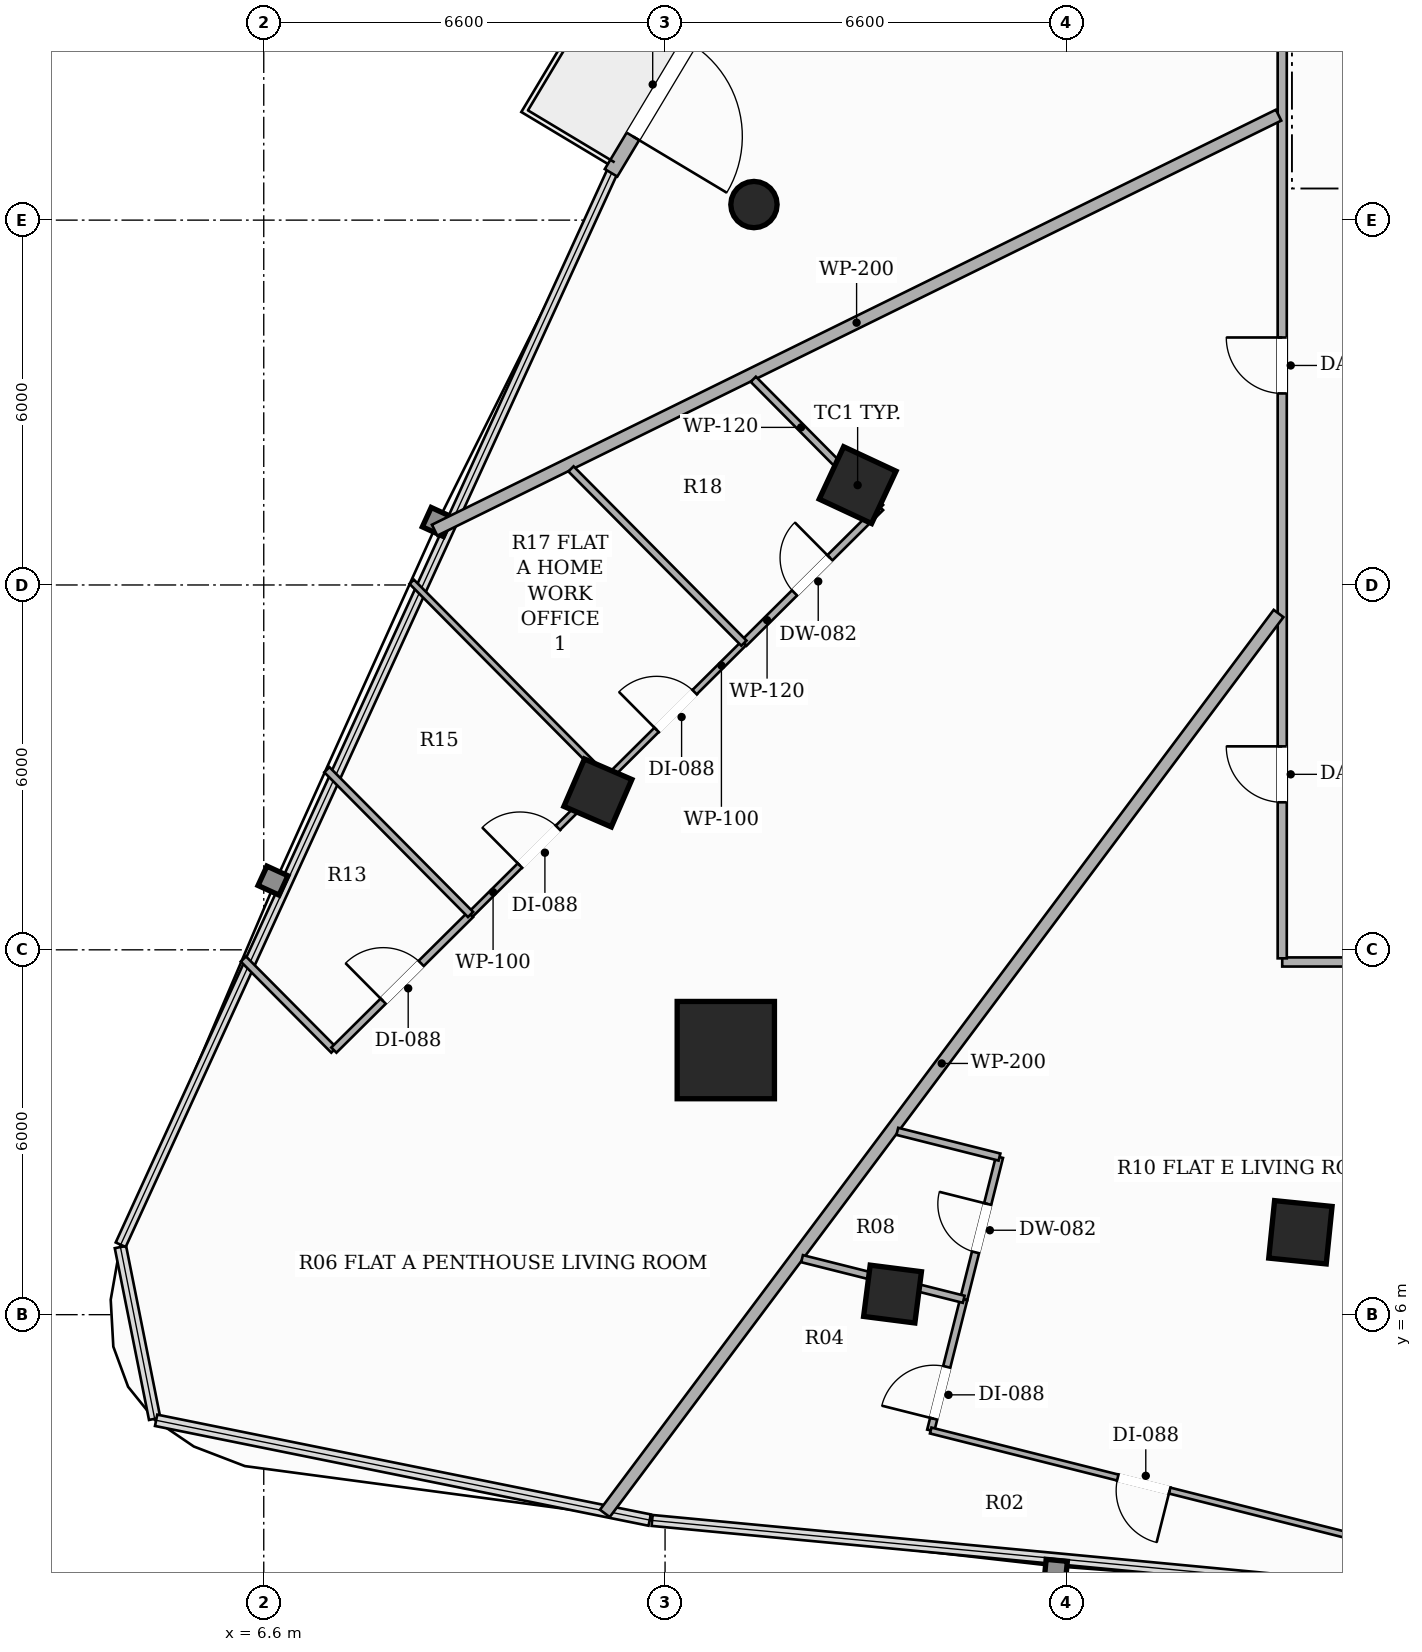
"""IFC4 building model, lengths in metres.
Left out: names, types, materials, properties, quantities, classifications, styles, units other than length and angle.
Written with IfcOpenShell. Run it as: python <this file> out.ifc"""

import sys

from ifc_helpers import new_model, si_unit, direction, frame, frame_2d, origin, origin_2d, place, context, subcontext, project, spatial, rectangle, hollow_rectangle, hollow_circle, extrude, element, fill, save


model = new_model("IFC4")
c1 = context("Model", 3, precision=1e-05, world=origin(), true_north=direction((0.0, 1.0)))
c2 = subcontext(c1, "Body", "Model", "MODEL_VIEW")
j1 = project(units=[si_unit("LENGTHUNIT", "METRE"), si_unit("PLANEANGLEUNIT", "RADIAN")], contexts=[c1])
p1 = place(None, origin())
s1 = spatial("IfcSite", under=j1, at=p1, CompositionType="ELEMENT")
p2 = place(p1, origin())
s2 = spatial("IfcBuilding", under=s1, at=p2, CompositionType="ELEMENT")
p3 = place(p2, frame((0.0, 0.0, 33.5)))
s3 = spatial("IfcBuildingStorey", under=s2, at=p3, CompositionType="ELEMENT", Elevation=33.5)
p4 = place(p3, frame((14.199, 10.351, 0.0), z_axis=(0.0, 0.0, 1.0), x_axis=(1.0, 0.0, 0.0)))
e1 = element("IfcColumn", 1, at=p4, inside=s3, PredefinedType="COLUMN", context=c2, shape_type="SweptSolid", body=[
    extrude(hollow_rectangle(XDim=1.6, YDim=1.6, WallThickness=0.05, at=origin_2d()), origin(), (0.0, 0.0, 1.0), 3.3),
])
for number, where, z_axis, x_axis in (
    (2, (16.367, 19.642, 0.0), (0.0, 0.0, 1.0), (0.423, 0.906, 0.0)),
    (3, (23.649, 7.355, 0.0), (0.0, 0.0, 1.0), (-0.995, 0.101, 0.0)),
):
    element("IfcColumn", number, at=place(p3, frame(where, z_axis=z_axis, x_axis=x_axis)), inside=s3, PredefinedType="COLUMN", context=c2, shape_type="SweptSolid", body=[
        extrude(hollow_rectangle(XDim=0.95, YDim=0.95, WallThickness=0.032, at=origin_2d()), origin(), (0.0, 0.0, 1.0), 3.3),
    ])
for number, where, z_axis, x_axis in (
    (4, (12.095, 14.58, 0.0), (0.0, 0.0, 1.0), (0.397, 0.918, 0.0)),
    (5, (16.941, 6.339, 0.0), (0.0, 0.0, 1.0), (-0.992, 0.127, 0.0)),
):
    element("IfcColumn", number, at=place(p3, frame(where, z_axis=z_axis, x_axis=x_axis)), inside=s3, PredefinedType="COLUMN", context=c2, shape_type="SweptSolid", body=[
        extrude(hollow_rectangle(XDim=0.85, YDim=0.85, WallThickness=0.028, at=origin_2d()), origin(), (0.0, 0.0, 1.0), 3.3),
    ])
p5 = place(p3, frame((14.662, 24.256, 0.0), z_axis=(0.0, 0.0, 1.0), x_axis=(1.0, 0.0, 0.0)))
e6 = element("IfcColumn", 6, at=p5, inside=s3, PredefinedType="COLUMN", context=c2, shape_type="SweptSolid", body=[
    extrude(hollow_circle(Radius=0.381, WallThickness=0.022, at=origin_2d()), origin(), (0.0, 0.0, 1.0), 3.3),
])
p6 = place(p3, frame((19.059, 36.028, 0.0), z_axis=(0.0, 0.0, 1.0), x_axis=(-0.514331531946, -0.857591438417, 0.0)))
e7 = element("IfcWall", 7, at=p6, inside=s3, PredefinedType="SOLIDWALL", context=c2, shape_type="SweptSolid", body=[
    extrude(rectangle(XDim=13.118, YDim=0.24, at=frame_2d((6.559, 0.0))), origin(), (0.0, 0.0, 1.0), 2.624),
])
p7 = place(p6, frame((10.62, 0.0, 0.0)))
e8 = element("IfcOpeningElement", 8, at=p7, cuts=e7, PredefinedType="OPENING", context=c2, shape_type="SweptSolid", body=[
    extrude(rectangle(XDim=1.8, YDim=2.2, at=frame_2d((0.9, 1.1))), frame((0.0, 0.13, 0.0), z_axis=(0.0, -1.0, 0.0), x_axis=(1.0, 0.0, 0.0)), (0.0, 0.0, 1.0), 0.26),
])
p8 = place(p3, frame((42.59, 11.8, 0.0), z_axis=(0.0, 0.0, 1.0), x_axis=(-1.0, 0.0, 0.0)))
e9 = element("IfcWall", 9, at=p8, inside=s3, PredefinedType="PARTITIONING", context=c2, shape_type="SweptSolid", body=[
    extrude(rectangle(XDim=19.24, YDim=0.15, at=frame_2d((9.62, 0.0))), origin(), (0.0, 0.0, 1.0), 2.669),
])
p9 = place(p8, frame((10.462, 0.0, 0.0)))
e10 = element("IfcOpeningElement", 10, at=p9, cuts=e9, PredefinedType="OPENING", context=c2, shape_type="SweptSolid", body=[
    extrude(rectangle(XDim=0.92, YDim=2.15, at=frame_2d((0.46, 1.075))), frame((0.0, 0.085, 0.0), z_axis=(0.0, -1.0, 0.0), x_axis=(1.0, 0.0, 0.0)), (0.0, 0.0, 1.0), 0.17),
])
p10 = place(p3, frame((23.35, 11.86, 0.0), z_axis=(0.0, 0.0, 1.0), x_axis=(0.0, 1.0, 0.0)))
e11 = element("IfcWall", 11, at=p10, inside=s3, PredefinedType="PARTITIONING", context=c2, shape_type="SweptSolid", body=[
    extrude(rectangle(XDim=25.04, YDim=0.15, at=frame_2d((12.52, 0.0))), origin(), (0.0, 0.0, 1.0), 2.413),
])
p11 = place(p10, frame((9.29, 0.0, 0.0)))
e12 = element("IfcOpeningElement", 12, at=p11, cuts=e11, PredefinedType="OPENING", context=c2, shape_type="SweptSolid", body=[
    extrude(rectangle(XDim=0.92, YDim=2.15, at=frame_2d((0.46, 1.075))), frame((0.0, 0.085, 0.0), z_axis=(0.0, -1.0, 0.0), x_axis=(1.0, 0.0, 0.0)), (0.0, 0.0, 1.0), 0.17),
])
p12 = place(p10, frame((18.865, 0.0, 0.0)))
e13 = element("IfcOpeningElement", 13, at=p12, cuts=e11, PredefinedType="OPENING", context=c2, shape_type="SweptSolid", body=[
    extrude(rectangle(XDim=0.88, YDim=2.1, at=frame_2d((0.44, 1.05))), frame((0.0, 0.085, 0.0), z_axis=(0.0, -1.0, 0.0), x_axis=(1.0, 0.0, 0.0)), (0.0, 0.0, 1.0), 0.17),
])
p13 = place(p10, frame((2.566, 0.0, 0.0)))
e14 = element("IfcOpeningElement", 14, at=p13, cuts=e11, PredefinedType="OPENING", context=c2, shape_type="SweptSolid", body=[
    extrude(rectangle(XDim=0.92, YDim=2.15, at=frame_2d((0.46, 1.075))), frame((0.0, 0.085, 0.0), z_axis=(0.0, -1.0, 0.0), x_axis=(1.0, 0.0, 0.0)), (0.0, 0.0, 1.0), 0.17),
])
p14 = place(p3, frame((9.41, 18.901, 0.0), z_axis=(0.0, 0.0, 1.0), x_axis=(0.89737804177, 0.44126256373, 0.0)))
e15 = element("IfcWall", 15, at=p14, inside=s3, PredefinedType="PARTITIONING", context=c2, shape_type="SweptSolid", body=[
    extrude(rectangle(XDim=15.468, YDim=0.2, at=frame_2d((7.734, 0.0))), origin(), (0.0, 0.0, 1.0), 2.413),
])
p15 = place(p3, frame((23.29, 17.531, 0.0), z_axis=(0.0, 0.0, 1.0), x_axis=(-0.599334217596, -0.800498904196, 0.0)))
e16 = element("IfcWall", 16, at=p15, inside=s3, PredefinedType="PARTITIONING", context=c2, shape_type="SweptSolid", body=[
    extrude(rectangle(XDim=18.487, YDim=0.2, at=frame_2d((9.244, 0.0))), origin(), (0.0, 0.0, 1.0), 2.413),
])
p16 = place(p3, frame((27.447, 11.74, 0.0), z_axis=(0.0, 0.0, 1.0), x_axis=(-0.283867721737, -0.958863450422, 0.0)))
e17 = element("IfcWall", 17, at=p16, inside=s3, PredefinedType="PARTITIONING", context=c2, shape_type="SweptSolid", body=[
    extrude(rectangle(XDim=10.664, YDim=0.2, at=frame_2d((5.332, 0.0))), origin(), (0.0, 0.0, 1.0), 2.413),
])
p17 = place(p3, frame((14.497, 17.043, 0.0), z_axis=(0.0, 0.0, 1.0), x_axis=(0.709608291954, 0.704596389425, 0.0)))
e18 = element("IfcWall", 18, at=p17, inside=s3, PredefinedType="PARTITIONING", context=c2, shape_type="SweptSolid", body=[
    extrude(rectangle(XDim=3.166, YDim=0.12, at=frame_2d((1.583, 0.0))), origin(), (0.0, 0.0, 1.0), 2.413),
])
p18 = place(p17, frame((1.173, 0.0, 0.0)))
e19 = element("IfcOpeningElement", 19, at=p18, cuts=e18, PredefinedType="OPENING", context=c2, shape_type="SweptSolid", body=[
    extrude(rectangle(XDim=0.82, YDim=2.1, at=frame_2d((0.41, 1.05))), frame((0.0, 0.07, 0.0), z_axis=(0.0, -1.0, 0.0), x_axis=(1.0, 0.0, 0.0)), (0.0, 0.0, 1.0), 0.14),
])
p19 = place(p3, frame((16.744, 19.274, 0.0), z_axis=(0.0, 0.0, 1.0), x_axis=(-0.704390177625, 0.709812987811, 0.0)))
e20 = element("IfcWall", 20, at=p19, inside=s3, PredefinedType="PARTITIONING", context=c2, shape_type="SweptSolid", body=[
    extrude(rectangle(XDim=2.971, YDim=0.12, at=frame_2d((1.486, 0.0))), origin(), (0.0, 0.0, 1.0), 2.413),
])
p20 = place(p3, frame((6.265, 11.849, 0.0), z_axis=(0.0, 0.0, 1.0), x_axis=(0.7047325022, -0.709473114602, 0.0)))
e21 = element("IfcWall", 21, at=p20, inside=s3, PredefinedType="PARTITIONING", context=c2, shape_type="SweptSolid", body=[
    extrude(rectangle(XDim=2.112, YDim=0.12, at=frame_2d((1.056, 0.0))), origin(), (0.0, 0.0, 1.0), 2.619),
])
p21 = place(p3, frame((7.753, 10.351, 0.0), z_axis=(0.0, 0.0, 1.0), x_axis=(0.709953794815, 0.704248258236, 0.0)))
e22 = element("IfcWall", 22, at=p21, inside=s3, PredefinedType="PARTITIONING", context=c2, shape_type="SweptSolid", body=[
    extrude(rectangle(XDim=3.167, YDim=0.12, at=frame_2d((1.583, 0.0))), origin(), (0.0, 0.0, 1.0), 2.619),
])
p22 = place(p21, frame((1.143, 0.0, 0.0)))
e23 = element("IfcOpeningElement", 23, at=p22, cuts=e22, PredefinedType="OPENING", context=c2, shape_type="SweptSolid", body=[
    extrude(rectangle(XDim=0.88, YDim=2.1, at=frame_2d((0.44, 1.05))), frame((0.0, 0.07, 0.0), z_axis=(0.0, -1.0, 0.0), x_axis=(1.0, 0.0, 0.0)), (0.0, 0.0, 1.0), 0.14),
])
p23 = place(p3, frame((10.001, 12.581, 0.0), z_axis=(0.0, 0.0, 1.0), x_axis=(0.70979961262, 0.70440365553, 0.0)))
e24 = element("IfcWall", 24, at=p23, inside=s3, PredefinedType="PARTITIONING", context=c2, shape_type="SweptSolid", body=[
    extrude(rectangle(XDim=3.167, YDim=0.1, at=frame_2d((1.583, 0.0))), origin(), (0.0, 0.0, 1.0), 2.413),
])
p24 = place(p23, frame((1.144, 0.0, 0.0)))
e25 = element("IfcOpeningElement", 25, at=p24, cuts=e24, PredefinedType="OPENING", context=c2, shape_type="SweptSolid", body=[
    extrude(rectangle(XDim=0.88, YDim=2.1, at=frame_2d((0.44, 1.05))), frame((0.0, 0.06, 0.0), z_axis=(0.0, -1.0, 0.0), x_axis=(1.0, 0.0, 0.0)), (0.0, 0.0, 1.0), 0.12),
])
p25 = place(p3, frame((12.249, 14.812, 0.0), z_axis=(0.0, 0.0, 1.0), x_axis=(0.70979961262, 0.70440365553, 0.0)))
e26 = element("IfcWall", 26, at=p25, inside=s3, PredefinedType="PARTITIONING", context=c2, shape_type="SweptSolid", body=[
    extrude(rectangle(XDim=3.167, YDim=0.1, at=frame_2d((1.583, 0.0))), origin(), (0.0, 0.0, 1.0), 2.413),
])
p26 = place(p25, frame((1.144, 0.0, 0.0)))
e27 = element("IfcOpeningElement", 27, at=p26, cuts=e26, PredefinedType="OPENING", context=c2, shape_type="SweptSolid", body=[
    extrude(rectangle(XDim=0.88, YDim=2.1, at=frame_2d((0.44, 1.05))), frame((0.0, 0.06, 0.0), z_axis=(0.0, -1.0, 0.0), x_axis=(1.0, 0.0, 0.0)), (0.0, 0.0, 1.0), 0.12),
])
p27 = place(p3, frame((14.497, 17.043, 0.0), z_axis=(0.0, 0.0, 1.0), x_axis=(-0.704380529073, 0.70982256252, 0.0)))
e28 = element("IfcWall", 28, at=p27, inside=s3, PredefinedType="PARTITIONING", context=c2, shape_type="SweptSolid", body=[
    extrude(rectangle(XDim=4.038, YDim=0.12, at=frame_2d((2.019, 0.0))), origin(), (0.0, 0.0, 1.0), 2.413),
])
p28 = place(p3, frame((7.638, 14.962, 0.0), z_axis=(0.0, 0.0, 1.0), x_axis=(0.704445292194, -0.709758290058, 0.0)))
e29 = element("IfcWall", 29, at=p28, inside=s3, PredefinedType="PARTITIONING", context=c2, shape_type="SweptSolid", body=[
    extrude(rectangle(XDim=3.354, YDim=0.12, at=frame_2d((1.677, 0.0))), origin(), (0.0, 0.0, 1.0), 3.06),
])
p29 = place(p3, frame((9.033, 18.053, 0.0), z_axis=(0.0, 0.0, 1.0), x_axis=(0.704374497722, -0.709828547579, 0.0)))
e30 = element("IfcWall", 30, at=p29, inside=s3, PredefinedType="PARTITIONING", context=c2, shape_type="SweptSolid", body=[
    extrude(rectangle(XDim=4.566, YDim=0.1, at=frame_2d((2.283, 0.0))), origin(), (0.0, 0.0, 1.0), 2.413),
])
p30 = place(p3, frame((18.112, 6.253, 0.0), z_axis=(0.0, 0.0, 1.0), x_axis=(0.2437501366, 0.96983806427, 0.0)))
e31 = element("IfcWall", 31, at=p30, inside=s3, PredefinedType="PARTITIONING", context=c2, shape_type="SweptSolid", body=[
    extrude(rectangle(XDim=2.412, YDim=0.12, at=frame_2d((1.206, 0.0))), origin(), (0.0, 0.0, 1.0), 2.413),
])
p31 = place(p30, frame((0.796, 0.0, 0.0)))
e32 = element("IfcOpeningElement", 32, at=p31, cuts=e31, PredefinedType="OPENING", context=c2, shape_type="SweptSolid", body=[
    extrude(rectangle(XDim=0.82, YDim=2.1, at=frame_2d((0.41, 1.05))), frame((0.0, 0.07, 0.0), z_axis=(0.0, -1.0, 0.0), x_axis=(1.0, 0.0, 0.0)), (0.0, 0.0, 1.0), 0.14),
])
p32 = place(p3, frame((18.7, 8.592, 0.0), z_axis=(0.0, 0.0, 1.0), x_axis=(-0.969751613308, 0.244093851802, 0.0)))
e33 = element("IfcWall", 33, at=p32, inside=s3, PredefinedType="PARTITIONING", context=c2, shape_type="SweptSolid", body=[
    extrude(rectangle(XDim=1.732, YDim=0.12, at=frame_2d((0.866, 0.0))), origin(), (0.0, 0.0, 1.0), 2.669),
])
p33 = place(p3, frame((17.569, 4.095, 0.0), z_axis=(0.0, 0.0, 1.0), x_axis=(0.244006821807, 0.969773515266, 0.0)))
e34 = element("IfcWall", 34, at=p33, inside=s3, PredefinedType="PARTITIONING", context=c2, shape_type="SweptSolid", body=[
    extrude(rectangle(XDim=2.225, YDim=0.12, at=frame_2d((1.113, 0.0))), origin(), (0.0, 0.0, 1.0), 2.413),
])
p34 = place(p33, frame((0.2, 0.0, 0.0)))
e35 = element("IfcOpeningElement", 35, at=p34, cuts=e34, PredefinedType="OPENING", context=c2, shape_type="SweptSolid", body=[
    extrude(rectangle(XDim=0.88, YDim=2.1, at=frame_2d((0.44, 1.05))), frame((0.0, 0.07, 0.0), z_axis=(0.0, -1.0, 0.0), x_axis=(1.0, 0.0, 0.0)), (0.0, 0.0, 1.0), 0.14),
])
p35 = place(p3, frame((24.574, 2.334, 0.0), z_axis=(0.0, 0.0, 1.0), x_axis=(-0.9698235368, 0.243807931512, 0.0)))
e36 = element("IfcWall", 36, at=p35, inside=s3, PredefinedType="PARTITIONING", context=c2, shape_type="SweptSolid", body=[
    extrude(rectangle(XDim=7.223, YDim=0.1, at=frame_2d((3.611, 0.0))), origin(), (0.0, 0.0, 1.0), 3.06),
])
p36 = place(p35, frame((3.171, 0.0, 0.0)))
e37 = element("IfcOpeningElement", 37, at=p36, cuts=e36, PredefinedType="OPENING", context=c2, shape_type="SweptSolid", body=[
    extrude(rectangle(XDim=0.88, YDim=2.1, at=frame_2d((0.44, 1.05))), frame((0.0, 0.06, 0.0), z_axis=(0.0, -1.0, 0.0), x_axis=(1.0, 0.0, 0.0)), (0.0, 0.0, 1.0), 0.12),
])
p37 = place(p3, frame((18.112, 6.253, 0.0), z_axis=(0.0, 0.0, 1.0), x_axis=(-0.969869517874, 0.243624954178, 0.0)))
e38 = element("IfcWall", 38, at=p37, inside=s3, PredefinedType="PARTITIONING", context=c2, shape_type="SweptSolid", body=[
    extrude(rectangle(XDim=2.742, YDim=0.12, at=frame_2d((1.371, 0.0))), origin(), (0.0, 0.0, 1.0), 2.413),
])
p38 = place(p7, origin())
e39 = element("IfcDoor", 39, at=p38, inside=s3, OperationType="SINGLE_SWING_RIGHT", PredefinedType="DOOR", context=c2, shape_type="SweptSolid", body=[
    extrude(rectangle(XDim=1.8, YDim=2.2, at=frame_2d((0.9, 1.1))), frame((0.0, 0.025, 0.0), z_axis=(0.0, -1.0, 0.0), x_axis=(1.0, 0.0, 0.0)), (0.0, 0.0, 1.0), 0.05),
])
fill(e8, e39)
p39 = place(p11, origin())
e40 = element("IfcDoor", 40, at=p39, inside=s3, OperationType="SINGLE_SWING_RIGHT", PredefinedType="DOOR", context=c2, shape_type="SweptSolid", body=[
    extrude(rectangle(XDim=0.92, YDim=2.15, at=frame_2d((0.46, 1.075))), frame((0.0, 0.025, 0.0), z_axis=(0.0, -1.0, 0.0), x_axis=(1.0, 0.0, 0.0)), (0.0, 0.0, 1.0), 0.05),
])
fill(e12, e40)
p40 = place(p18, origin())
e41 = element("IfcDoor", 41, at=p40, inside=s3, OperationType="SINGLE_SWING_RIGHT", PredefinedType="DOOR", context=c2, shape_type="SweptSolid", body=[
    extrude(rectangle(XDim=0.82, YDim=2.1, at=frame_2d((0.41, 1.05))), frame((0.0, 0.025, 0.0), z_axis=(0.0, -1.0, 0.0), x_axis=(1.0, 0.0, 0.0)), (0.0, 0.0, 1.0), 0.05),
])
fill(e19, e41)
p41 = place(p22, origin())
e42 = element("IfcDoor", 42, at=p41, inside=s3, OperationType="SINGLE_SWING_LEFT", PredefinedType="DOOR", context=c2, shape_type="SweptSolid", body=[
    extrude(rectangle(XDim=0.88, YDim=2.1, at=frame_2d((0.44, 1.05))), frame((0.0, 0.025, 0.0), z_axis=(0.0, -1.0, 0.0), x_axis=(1.0, 0.0, 0.0)), (0.0, 0.0, 1.0), 0.05),
])
fill(e23, e42)
p42 = place(p24, origin())
e43 = element("IfcDoor", 43, at=p42, inside=s3, OperationType="SINGLE_SWING_LEFT", PredefinedType="DOOR", context=c2, shape_type="SweptSolid", body=[
    extrude(rectangle(XDim=0.88, YDim=2.1, at=frame_2d((0.44, 1.05))), frame((0.0, 0.025, 0.0), z_axis=(0.0, -1.0, 0.0), x_axis=(1.0, 0.0, 0.0)), (0.0, 0.0, 1.0), 0.05),
])
fill(e25, e43)
p43 = place(p26, origin())
e44 = element("IfcDoor", 44, at=p43, inside=s3, OperationType="SINGLE_SWING_LEFT", PredefinedType="DOOR", context=c2, shape_type="SweptSolid", body=[
    extrude(rectangle(XDim=0.88, YDim=2.1, at=frame_2d((0.44, 1.05))), frame((0.0, 0.025, 0.0), z_axis=(0.0, -1.0, 0.0), x_axis=(1.0, 0.0, 0.0)), (0.0, 0.0, 1.0), 0.05),
])
fill(e27, e44)
p44 = place(p13, origin())
e45 = element("IfcDoor", 45, at=p44, inside=s3, OperationType="SINGLE_SWING_RIGHT", PredefinedType="DOOR", context=c2, shape_type="SweptSolid", body=[
    extrude(rectangle(XDim=0.92, YDim=2.15, at=frame_2d((0.46, 1.075))), frame((0.0, 0.025, 0.0), z_axis=(0.0, -1.0, 0.0), x_axis=(1.0, 0.0, 0.0)), (0.0, 0.0, 1.0), 0.05),
])
fill(e14, e45)
p45 = place(p31, origin())
e46 = element("IfcDoor", 46, at=p45, inside=s3, OperationType="SINGLE_SWING_RIGHT", PredefinedType="DOOR", context=c2, shape_type="SweptSolid", body=[
    extrude(rectangle(XDim=0.82, YDim=2.1, at=frame_2d((0.41, 1.05))), frame((0.0, 0.025, 0.0), z_axis=(0.0, -1.0, 0.0), x_axis=(1.0, 0.0, 0.0)), (0.0, 0.0, 1.0), 0.05),
])
fill(e32, e46)
p46 = place(p34, origin())
e47 = element("IfcDoor", 47, at=p46, inside=s3, OperationType="SINGLE_SWING_LEFT", PredefinedType="DOOR", context=c2, shape_type="SweptSolid", body=[
    extrude(rectangle(XDim=0.88, YDim=2.1, at=frame_2d((0.44, 1.05))), frame((0.0, 0.025, 0.0), z_axis=(0.0, -1.0, 0.0), x_axis=(1.0, 0.0, 0.0)), (0.0, 0.0, 1.0), 0.05),
])
fill(e35, e47)
p47 = place(p36, origin())
e48 = element("IfcDoor", 48, at=p47, inside=s3, OperationType="SINGLE_SWING_LEFT", PredefinedType="DOOR", context=c2, shape_type="SweptSolid", body=[
    extrude(rectangle(XDim=0.88, YDim=2.1, at=frame_2d((0.44, 1.05))), frame((0.0, 0.025, 0.0), z_axis=(0.0, -1.0, 0.0), x_axis=(1.0, 0.0, 0.0)), (0.0, 0.0, 1.0), 0.05),
])
fill(e37, e48)
save(model, sys.argv[1])
